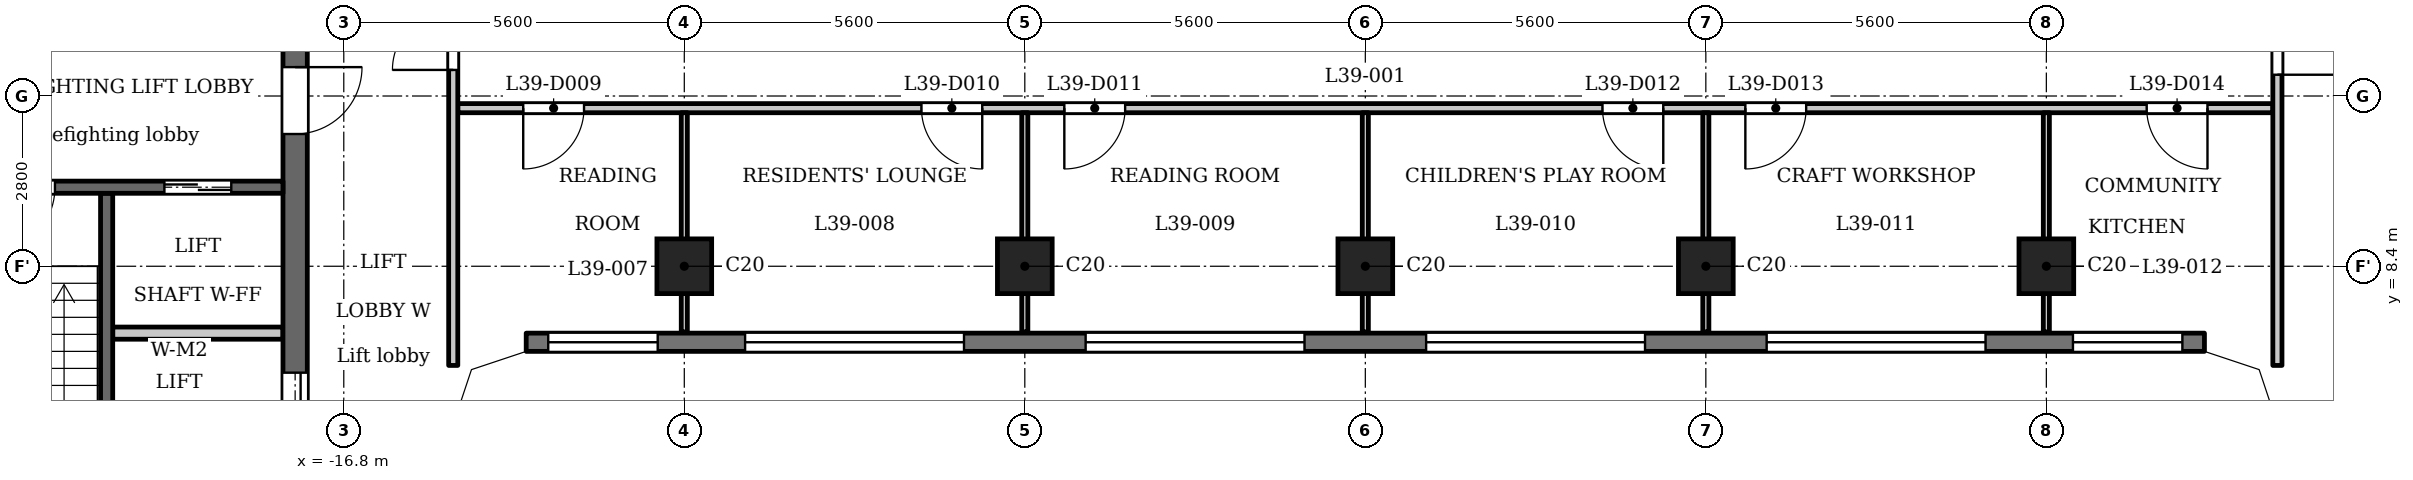
"""IFC4 building model, lengths in metres.
Left out: names, types, materials, properties, quantities, classifications, styles, units other than length and angle.
Written with IfcOpenShell. Run it as: python <this file> out.ifc"""

import sys

from ifc_helpers import new_model, si_unit, direction, frame, frame_2d, origin, origin_2d, place, context, subcontext, project, spatial, polyline, rectangle, outline, extrude, element, fill, save


model = new_model("IFC4")
c1 = context("Model", 3, precision=1e-05, world=origin(), true_north=direction((0.0, 1.0)))
c2 = subcontext(c1, "Body", "Model", "MODEL_VIEW")
j1 = project(units=[si_unit("LENGTHUNIT", "METRE"), si_unit("PLANEANGLEUNIT", "RADIAN")], contexts=[c1])
p1 = place(None, origin())
s1 = spatial("IfcSite", under=j1, at=p1, CompositionType="ELEMENT")
p2 = place(p1, origin())
s2 = spatial("IfcBuilding", under=s1, at=p2, CompositionType="ELEMENT")
p3 = place(p2, frame((0.0, 0.0, 153.6)))
s3 = spatial("IfcBuildingStorey", under=s2, at=p3, CompositionType="ELEMENT", Elevation=153.6)
for number, where, z_axis, x_axis in (
    (1, (-11.2, 8.4, 0.0), (0.0, 0.0, 1.0), (1.0, 0.0, 0.0)),
    (2, (-5.6, 8.4, 0.0), (0.0, 0.0, 1.0), (1.0, 0.0, 0.0)),
    (3, (0.0, 8.4, 0.0), (0.0, 0.0, 1.0), (1.0, 0.0, 0.0)),
    (4, (5.6, 8.4, 0.0), (0.0, 0.0, 1.0), (1.0, 0.0, 0.0)),
    (5, (11.2, 8.4, 0.0), (0.0, 0.0, 1.0), (1.0, 0.0, 0.0)),
):
    element("IfcColumn", number, at=place(p3, frame(where, z_axis=z_axis, x_axis=x_axis)), inside=s3, PredefinedType="COLUMN", context=c2, shape_type="SweptSolid", body=[
        extrude(rectangle(XDim=0.9, YDim=0.9, at=origin_2d()), origin(), (0.0, 0.0, 1.0), 3.5),
    ])
p4 = place(p3, frame((-13.8, 7.15, 0.0), z_axis=(0.0, 0.0, 1.0), x_axis=(1.0, 0.0, 0.0)))
e6 = element("IfcWall", 6, at=p4, inside=s3, PredefinedType="SOLIDWALL", context=c2, shape_type="SweptSolid", body=[
    extrude(rectangle(XDim=27.6, YDim=0.3, at=frame_2d((13.8, 0.0))), origin(), (0.0, 0.0, 1.0), 3.2),
])
p5 = place(p4, frame((0.363, 0.0, 0.9)))
e7 = element("IfcOpeningElement", 7, at=p5, cuts=e6, PredefinedType="OPENING", context=c2, shape_type="SweptSolid", body=[
    extrude(rectangle(XDim=1.8, YDim=1.25, at=frame_2d((0.9, 0.625))), frame((0.0, 0.16, 0.0), z_axis=(0.0, -1.0, 0.0), x_axis=(1.0, 0.0, 0.0)), (0.0, 0.0, 1.0), 0.32),
])
p6 = place(p4, frame((3.6, 0.0, 1.2)))
e8 = element("IfcOpeningElement", 8, at=p6, cuts=e6, PredefinedType="OPENING", context=c2, shape_type="SweptSolid", body=[
    extrude(rectangle(XDim=3.6, YDim=0.95, at=frame_2d((1.8, 0.475))), frame((0.0, 0.16, 0.0), z_axis=(0.0, -1.0, 0.0), x_axis=(1.0, 0.0, 0.0)), (0.0, 0.0, 1.0), 0.32),
])
p7 = place(p4, frame((9.2, 0.0, 1.2)))
e9 = element("IfcOpeningElement", 9, at=p7, cuts=e6, PredefinedType="OPENING", context=c2, shape_type="SweptSolid", body=[
    extrude(rectangle(XDim=3.6, YDim=0.95, at=frame_2d((1.8, 0.475))), frame((0.0, 0.16, 0.0), z_axis=(0.0, -1.0, 0.0), x_axis=(1.0, 0.0, 0.0)), (0.0, 0.0, 1.0), 0.32),
])
p8 = place(p4, frame((14.8, 0.0, 1.2)))
e10 = element("IfcOpeningElement", 10, at=p8, cuts=e6, PredefinedType="OPENING", context=c2, shape_type="SweptSolid", body=[
    extrude(rectangle(XDim=3.6, YDim=0.95, at=frame_2d((1.8, 0.475))), frame((0.0, 0.16, 0.0), z_axis=(0.0, -1.0, 0.0), x_axis=(1.0, 0.0, 0.0)), (0.0, 0.0, 1.0), 0.32),
])
p9 = place(p4, frame((20.4, 0.0, 1.2)))
e11 = element("IfcOpeningElement", 11, at=p9, cuts=e6, PredefinedType="OPENING", context=c2, shape_type="SweptSolid", body=[
    extrude(rectangle(XDim=3.6, YDim=0.95, at=frame_2d((1.8, 0.475))), frame((0.0, 0.16, 0.0), z_axis=(0.0, -1.0, 0.0), x_axis=(1.0, 0.0, 0.0)), (0.0, 0.0, 1.0), 0.32),
])
p10 = place(p4, frame((25.438, 0.0, 0.9)))
e12 = element("IfcOpeningElement", 12, at=p10, cuts=e6, PredefinedType="OPENING", context=c2, shape_type="SweptSolid", body=[
    extrude(rectangle(XDim=1.8, YDim=1.25, at=frame_2d((0.9, 0.625))), frame((0.0, 0.16, 0.0), z_axis=(0.0, -1.0, 0.0), x_axis=(1.0, 0.0, 0.0)), (0.0, 0.0, 1.0), 0.32),
])
p11 = place(p3, frame((-20.7, 2.6, 0.0), z_axis=(0.0, 0.0, 1.0), x_axis=(0.0, 1.0, 0.0)))
e13 = element("IfcWall", 13, at=p11, inside=s3, PredefinedType="SHEAR", context=c2, shape_type="SweptSolid", body=[
    extrude(rectangle(XDim=7.0, YDim=0.2, at=frame_2d((3.5, 0.0))), origin(), (0.0, 0.0, 1.0), 3.2),
])
p12 = place(p3, frame((-17.6, -12.45, 0.0), z_axis=(0.0, 0.0, 1.0), x_axis=(0.0, 1.0, 0.0)))
e14 = element("IfcWall", 14, at=p12, inside=s3, PredefinedType="SHEAR", context=c2, shape_type="SweptSolid", body=[
    extrude(rectangle(XDim=24.9, YDim=0.4, at=frame_2d((12.45, 0.0))), origin(), (0.0, 0.0, 1.0), 3.2),
])
p13 = place(p12, frame((6.325, 0.0, 0.0)))
e15 = element("IfcOpeningElement", 15, at=p13, cuts=e14, PredefinedType="OPENING", context=c2, shape_type="SweptSolid", body=[
    extrude(rectangle(XDim=0.9, YDim=2.1, at=frame_2d((0.45, 1.05))), frame((0.0, 0.21, 0.0), z_axis=(0.0, -1.0, 0.0), x_axis=(1.0, 0.0, 0.0)), (0.0, 0.0, 1.0), 0.42),
])
p14 = place(p12, frame((9.925, 0.0, 0.0)))
e16 = element("IfcOpeningElement", 16, at=p14, cuts=e14, PredefinedType="OPENING", context=c2, shape_type="SweptSolid", body=[
    extrude(rectangle(XDim=0.9, YDim=2.1, at=frame_2d((0.45, 1.05))), frame((0.0, 0.21, 0.0), z_axis=(0.0, -1.0, 0.0), x_axis=(1.0, 0.0, 0.0)), (0.0, 0.0, 1.0), 0.42),
])
p15 = place(p12, frame((15.6, 0.0, 0.0)))
e17 = element("IfcOpeningElement", 17, at=p15, cuts=e14, PredefinedType="OPENING", context=c2, shape_type="SweptSolid", body=[
    extrude(rectangle(XDim=1.1, YDim=2.1, at=frame_2d((0.55, 1.05))), frame((0.0, 0.21, 0.0), z_axis=(0.0, -1.0, 0.0), x_axis=(1.0, 0.0, 0.0)), (0.0, 0.0, 1.0), 0.42),
])
p16 = place(p12, frame((18.0, 0.0, 0.0)))
e18 = element("IfcOpeningElement", 18, at=p16, cuts=e14, PredefinedType="OPENING", context=c2, shape_type="SweptSolid", body=[
    extrude(rectangle(XDim=1.1, YDim=2.1, at=frame_2d((0.55, 1.05))), frame((0.0, 0.21, 0.0), z_axis=(0.0, -1.0, 0.0), x_axis=(1.0, 0.0, 0.0)), (0.0, 0.0, 1.0), 0.42),
])
p17 = place(p12, frame((23.025, 0.0, 0.0)))
e19 = element("IfcOpeningElement", 19, at=p17, cuts=e14, PredefinedType="OPENING", context=c2, shape_type="SweptSolid", body=[
    extrude(rectangle(XDim=1.1, YDim=2.1, at=frame_2d((0.55, 1.05))), frame((0.0, 0.21, 0.0), z_axis=(0.0, -1.0, 0.0), x_axis=(1.0, 0.0, 0.0)), (0.0, 0.0, 1.0), 0.42),
])
p18 = place(p12, frame((0.775, 0.0, 0.0)))
e20 = element("IfcOpeningElement", 20, at=p18, cuts=e14, PredefinedType="OPENING", context=c2, shape_type="SweptSolid", body=[
    extrude(rectangle(XDim=1.1, YDim=2.1, at=frame_2d((0.55, 1.05))), frame((0.0, 0.21, 0.0), z_axis=(0.0, -1.0, 0.0), x_axis=(1.0, 0.0, 0.0)), (0.0, 0.0, 1.0), 0.42),
])
p19 = place(p12, frame((12.925, 0.0, 0.0)))
e21 = element("IfcOpeningElement", 21, at=p19, cuts=e14, PredefinedType="OPENING", context=c2, shape_type="SweptSolid", body=[
    extrude(rectangle(XDim=1.8, YDim=2.1, at=frame_2d((0.9, 1.05))), frame((0.0, 0.21, 0.0), z_axis=(0.0, -1.0, 0.0), x_axis=(1.0, 0.0, 0.0)), (0.0, 0.0, 1.0), 0.42),
])
p20 = place(p3, frame((-17.8, 7.3, 0.0), z_axis=(0.0, 0.0, 1.0), x_axis=(-1.0, 0.0, 0.0)))
e22 = element("IfcWall", 22, at=p20, inside=s3, PredefinedType="PARTITIONING", context=c2, shape_type="SweptSolid", body=[
    extrude(rectangle(XDim=2.8, YDim=0.2, at=frame_2d((1.4, 0.0))), origin(), (0.0, 0.0, 1.0), 3.2),
])
p21 = place(p3, frame((-17.8, 9.7, 0.0), z_axis=(0.0, 0.0, 1.0), x_axis=(-1.0, 0.0, 0.0)))
e23 = element("IfcWall", 23, at=p21, inside=s3, PredefinedType="SHEAR", context=c2, shape_type="SweptSolid", body=[
    extrude(rectangle(XDim=8.45, YDim=0.2, at=frame_2d((4.225, 0.0))), origin(), (0.0, 0.0, 1.0), 3.2),
])
p22 = place(p21, frame((0.85, 0.0, 0.0)))
e24 = element("IfcOpeningElement", 24, at=p22, cuts=e23, PredefinedType="OPENING", context=c2, shape_type="SweptSolid", body=[
    extrude(rectangle(XDim=1.1, YDim=2.1, at=frame_2d((0.55, 1.05))), frame((0.0, 0.11, 0.0), z_axis=(0.0, -1.0, 0.0), x_axis=(1.0, 0.0, 0.0)), (0.0, 0.0, 1.0), 0.22),
])
p23 = place(p21, frame((3.75, 0.0, 0.0)))
e25 = element("IfcOpeningElement", 25, at=p23, cuts=e23, PredefinedType="OPENING", context=c2, shape_type="SweptSolid", body=[
    extrude(rectangle(XDim=1.1, YDim=2.1, at=frame_2d((0.55, 1.05))), frame((0.0, 0.11, 0.0), z_axis=(0.0, -1.0, 0.0), x_axis=(1.0, 0.0, 0.0)), (0.0, 0.0, 1.0), 0.22),
])
p24 = place(p3, frame((-14.925, 11.0, 0.0), z_axis=(0.0, 0.0, 1.0), x_axis=(1.0, 0.0, 0.0)))
e26 = element("IfcWall", 26, at=p24, inside=s3, PredefinedType="PARTITIONING", context=c2, shape_type="SweptSolid", body=[
    extrude(rectangle(XDim=29.85, YDim=0.15, at=frame_2d((14.925, 0.0))), origin(), (0.0, 0.0, 1.0), 3.2),
])
p25 = place(p24, frame((1.076, 0.0, 0.0)))
e27 = element("IfcOpeningElement", 27, at=p25, cuts=e26, PredefinedType="OPENING", context=c2, shape_type="SweptSolid", body=[
    extrude(rectangle(XDim=1.0, YDim=2.1, at=frame_2d((0.5, 1.05))), frame((0.0, 0.085, 0.0), z_axis=(0.0, -1.0, 0.0), x_axis=(1.0, 0.0, 0.0)), (0.0, 0.0, 1.0), 0.17),
])
p26 = place(p24, frame((7.625, 0.0, 0.0)))
e28 = element("IfcOpeningElement", 28, at=p26, cuts=e26, PredefinedType="OPENING", context=c2, shape_type="SweptSolid", body=[
    extrude(rectangle(XDim=1.0, YDim=2.1, at=frame_2d((0.5, 1.05))), frame((0.0, 0.085, 0.0), z_axis=(0.0, -1.0, 0.0), x_axis=(1.0, 0.0, 0.0)), (0.0, 0.0, 1.0), 0.17),
])
p27 = place(p24, frame((9.975, 0.0, 0.0)))
e29 = element("IfcOpeningElement", 29, at=p27, cuts=e26, PredefinedType="OPENING", context=c2, shape_type="SweptSolid", body=[
    extrude(rectangle(XDim=1.0, YDim=2.1, at=frame_2d((0.5, 1.05))), frame((0.0, 0.085, 0.0), z_axis=(0.0, -1.0, 0.0), x_axis=(1.0, 0.0, 0.0)), (0.0, 0.0, 1.0), 0.17),
])
p28 = place(p24, frame((18.825, 0.0, 0.0)))
e30 = element("IfcOpeningElement", 30, at=p28, cuts=e26, PredefinedType="OPENING", context=c2, shape_type="SweptSolid", body=[
    extrude(rectangle(XDim=1.0, YDim=2.1, at=frame_2d((0.5, 1.05))), frame((0.0, 0.085, 0.0), z_axis=(0.0, -1.0, 0.0), x_axis=(1.0, 0.0, 0.0)), (0.0, 0.0, 1.0), 0.17),
])
p29 = place(p24, frame((21.175, 0.0, 0.0)))
e31 = element("IfcOpeningElement", 31, at=p29, cuts=e26, PredefinedType="OPENING", context=c2, shape_type="SweptSolid", body=[
    extrude(rectangle(XDim=1.0, YDim=2.1, at=frame_2d((0.5, 1.05))), frame((0.0, 0.085, 0.0), z_axis=(0.0, -1.0, 0.0), x_axis=(1.0, 0.0, 0.0)), (0.0, 0.0, 1.0), 0.17),
])
p30 = place(p24, frame((27.775, 0.0, 0.0)))
e32 = element("IfcOpeningElement", 32, at=p30, cuts=e26, PredefinedType="OPENING", context=c2, shape_type="SweptSolid", body=[
    extrude(rectangle(XDim=1.0, YDim=2.1, at=frame_2d((0.5, 1.05))), frame((0.0, 0.085, 0.0), z_axis=(0.0, -1.0, 0.0), x_axis=(1.0, 0.0, 0.0)), (0.0, 0.0, 1.0), 0.17),
])
p31 = place(p3, frame((-15.0, 6.769, 0.0), z_axis=(0.0, 0.0, 1.0), x_axis=(0.0, 1.0, 0.0)))
e33 = element("IfcWall", 33, at=p31, inside=s3, PredefinedType="PARTITIONING", context=c2, shape_type="SweptSolid", body=[
    extrude(rectangle(XDim=6.356, YDim=0.15, at=frame_2d((3.178, 0.0))), origin(), (0.0, 0.0, 1.0), 3.2),
])
p32 = place(p31, frame((4.86, 0.0, 0.0)))
e34 = element("IfcOpeningElement", 34, at=p32, cuts=e33, PredefinedType="OPENING", context=c2, shape_type="SweptSolid", body=[
    extrude(rectangle(XDim=1.0, YDim=2.1, at=frame_2d((0.5, 1.05))), frame((0.0, 0.085, 0.0), z_axis=(0.0, -1.0, 0.0), x_axis=(1.0, 0.0, 0.0)), (0.0, 0.0, 1.0), 0.17),
])
for number, where, z_axis, x_axis in (
    (35, (-11.2, 7.32, 0.0), (0.0, 0.0, 1.0), (0.0, 1.0, 0.0)),
    (36, (-5.6, 7.32, 0.0), (0.0, 0.0, 1.0), (0.0, 1.0, 0.0)),
    (37, (0.0, 7.32, 0.0), (0.0, 0.0, 1.0), (0.0, 1.0, 0.0)),
    (38, (5.6, 7.32, 0.0), (0.0, 0.0, 1.0), (0.0, 1.0, 0.0)),
    (39, (11.2, 7.32, 0.0), (0.0, 0.0, 1.0), (0.0, 1.0, 0.0)),
):
    element("IfcWall", number, at=place(p3, frame(where, z_axis=z_axis, x_axis=x_axis)), inside=s3, PredefinedType="PARTITIONING", context=c2, shape_type="SweptSolid", body=[
        extrude(rectangle(XDim=3.605, YDim=0.1, at=frame_2d((1.802, 0.0))), origin(), (0.0, 0.0, 1.0), 3.2),
    ])
p33 = place(p3, frame((15.0, 6.769, 0.0), z_axis=(0.0, 0.0, 1.0), x_axis=(0.0, 1.0, 0.0)))
e40 = element("IfcWall", 40, at=p33, inside=s3, PredefinedType="PARTITIONING", context=c2, shape_type="SweptSolid", body=[
    extrude(rectangle(XDim=6.356, YDim=0.15, at=frame_2d((3.178, 0.0))), origin(), (0.0, 0.0, 1.0), 3.2),
])
p34 = place(p33, frame((4.781, 0.0, 0.0)))
e41 = element("IfcOpeningElement", 41, at=p34, cuts=e40, PredefinedType="OPENING", context=c2, shape_type="SweptSolid", body=[
    extrude(rectangle(XDim=1.0, YDim=2.1, at=frame_2d((0.5, 1.05))), frame((0.0, 0.085, 0.0), z_axis=(0.0, -1.0, 0.0), x_axis=(1.0, 0.0, 0.0)), (0.0, 0.0, 1.0), 0.17),
])
p35 = place(p3, origin())
e42 = element("IfcWall", 42, at=p35, inside=s3, PredefinedType="SOLIDWALL", context=c2, shape_type="SweptSolid", body=[
    extrude(outline(polyline([(-13.849, 7.3), (-14.937, 6.937), (-15.3, 5.849), (-15.3, 5.8), (-15.0, 5.8), (-14.7, 6.7), (-13.8, 7.0), (-13.8, 7.3), (-13.849, 7.3)])), origin(), (0.0, 0.0, 1.0), 3.2),
])
e43 = element("IfcWall", 43, at=p35, inside=s3, PredefinedType="SOLIDWALL", context=c2, shape_type="SweptSolid", body=[
    extrude(outline(polyline([(14.937, 6.937), (13.849, 7.3), (13.8, 7.3), (13.8, 7.0), (14.7, 6.7), (15.0, 5.8), (15.3, 5.8), (15.3, 5.849), (14.937, 6.937)])), origin(), (0.0, 0.0, 1.0), 3.2),
])
p36 = place(p16, origin())
e44 = element("IfcDoor", 44, at=p36, inside=s3, OperationType="DOUBLE_DOOR_SLIDING", PredefinedType="DOOR", context=c2, shape_type="SweptSolid", body=[
    extrude(rectangle(XDim=1.1, YDim=2.1, at=frame_2d((0.55, 1.05))), frame((0.0, 0.025, 0.0), z_axis=(0.0, -1.0, 0.0), x_axis=(1.0, 0.0, 0.0)), (0.0, 0.0, 1.0), 0.05),
])
fill(e18, e44)
p37 = place(p22, origin())
e45 = element("IfcDoor", 45, at=p37, inside=s3, OperationType="DOUBLE_DOOR_SLIDING", PredefinedType="DOOR", context=c2, shape_type="SweptSolid", body=[
    extrude(rectangle(XDim=1.1, YDim=2.1, at=frame_2d((0.55, 1.05))), frame((0.0, 0.025, 0.0), z_axis=(0.0, -1.0, 0.0), x_axis=(1.0, 0.0, 0.0)), (0.0, 0.0, 1.0), 0.05),
])
fill(e24, e45)
p38 = place(p17, origin())
e46 = element("IfcDoor", 46, at=p38, inside=s3, OperationType="SINGLE_SWING_RIGHT", PredefinedType="DOOR", context=c2, shape_type="SweptSolid", body=[
    extrude(rectangle(XDim=1.1, YDim=2.1, at=frame_2d((0.55, 1.05))), frame((0.0, 0.025, 0.0), z_axis=(0.0, -1.0, 0.0), x_axis=(1.0, 0.0, 0.0)), (0.0, 0.0, 1.0), 0.05),
])
fill(e19, e46)
p39 = place(p23, origin())
e47 = element("IfcDoor", 47, at=p39, inside=s3, OperationType="SINGLE_SWING_LEFT", PredefinedType="DOOR", context=c2, shape_type="SweptSolid", body=[
    extrude(rectangle(XDim=1.1, YDim=2.1, at=frame_2d((0.55, 1.05))), frame((0.0, 0.025, 0.0), z_axis=(0.0, -1.0, 0.0), x_axis=(1.0, 0.0, 0.0)), (0.0, 0.0, 1.0), 0.05),
])
fill(e25, e47)
p40 = place(p32, origin())
e48 = element("IfcDoor", 48, at=p40, inside=s3, OperationType="SINGLE_SWING_RIGHT", PredefinedType="DOOR", context=c2, shape_type="SweptSolid", body=[
    extrude(rectangle(XDim=1.0, YDim=2.1, at=frame_2d((0.5, 1.05))), frame((0.0, 0.025, 0.0), z_axis=(0.0, -1.0, 0.0), x_axis=(1.0, 0.0, 0.0)), (0.0, 0.0, 1.0), 0.05),
])
fill(e34, e48)
p41 = place(p34, origin())
e49 = element("IfcDoor", 49, at=p41, inside=s3, OperationType="SINGLE_SWING_LEFT", PredefinedType="DOOR", context=c2, shape_type="SweptSolid", body=[
    extrude(rectangle(XDim=1.0, YDim=2.1, at=frame_2d((0.5, 1.05))), frame((0.0, 0.025, 0.0), z_axis=(0.0, -1.0, 0.0), x_axis=(1.0, 0.0, 0.0)), (0.0, 0.0, 1.0), 0.05),
])
fill(e41, e49)
p42 = place(p25, origin())
e50 = element("IfcDoor", 50, at=p42, inside=s3, OperationType="SINGLE_SWING_LEFT", PredefinedType="DOOR", context=c2, shape_type="SweptSolid", body=[
    extrude(rectangle(XDim=1.0, YDim=2.1, at=frame_2d((0.5, 1.05))), frame((0.0, 0.025, 0.0), z_axis=(0.0, -1.0, 0.0), x_axis=(1.0, 0.0, 0.0)), (0.0, 0.0, 1.0), 0.05),
])
fill(e27, e50)
p43 = place(p26, origin())
e51 = element("IfcDoor", 51, at=p43, inside=s3, OperationType="SINGLE_SWING_RIGHT", PredefinedType="DOOR", context=c2, shape_type="SweptSolid", body=[
    extrude(rectangle(XDim=1.0, YDim=2.1, at=frame_2d((0.5, 1.05))), frame((0.0, 0.025, 0.0), z_axis=(0.0, -1.0, 0.0), x_axis=(1.0, 0.0, 0.0)), (0.0, 0.0, 1.0), 0.05),
])
fill(e28, e51)
p44 = place(p27, origin())
e52 = element("IfcDoor", 52, at=p44, inside=s3, OperationType="SINGLE_SWING_LEFT", PredefinedType="DOOR", context=c2, shape_type="SweptSolid", body=[
    extrude(rectangle(XDim=1.0, YDim=2.1, at=frame_2d((0.5, 1.05))), frame((0.0, 0.025, 0.0), z_axis=(0.0, -1.0, 0.0), x_axis=(1.0, 0.0, 0.0)), (0.0, 0.0, 1.0), 0.05),
])
fill(e29, e52)
p45 = place(p28, origin())
e53 = element("IfcDoor", 53, at=p45, inside=s3, OperationType="SINGLE_SWING_RIGHT", PredefinedType="DOOR", context=c2, shape_type="SweptSolid", body=[
    extrude(rectangle(XDim=1.0, YDim=2.1, at=frame_2d((0.5, 1.05))), frame((0.0, 0.025, 0.0), z_axis=(0.0, -1.0, 0.0), x_axis=(1.0, 0.0, 0.0)), (0.0, 0.0, 1.0), 0.05),
])
fill(e30, e53)
p46 = place(p29, origin())
e54 = element("IfcDoor", 54, at=p46, inside=s3, OperationType="SINGLE_SWING_LEFT", PredefinedType="DOOR", context=c2, shape_type="SweptSolid", body=[
    extrude(rectangle(XDim=1.0, YDim=2.1, at=frame_2d((0.5, 1.05))), frame((0.0, 0.025, 0.0), z_axis=(0.0, -1.0, 0.0), x_axis=(1.0, 0.0, 0.0)), (0.0, 0.0, 1.0), 0.05),
])
fill(e31, e54)
p47 = place(p30, origin())
e55 = element("IfcDoor", 55, at=p47, inside=s3, OperationType="SINGLE_SWING_RIGHT", PredefinedType="DOOR", context=c2, shape_type="SweptSolid", body=[
    extrude(rectangle(XDim=1.0, YDim=2.1, at=frame_2d((0.5, 1.05))), frame((0.0, 0.025, 0.0), z_axis=(0.0, -1.0, 0.0), x_axis=(1.0, 0.0, 0.0)), (0.0, 0.0, 1.0), 0.05),
])
fill(e32, e55)
p48 = place(p5, origin())
e56 = element("IfcWindow", 56, at=p48, inside=s3, PartitioningType="SINGLE_PANEL", PredefinedType="WINDOW", context=c2, shape_type="SweptSolid", body=[
    extrude(rectangle(XDim=1.8, YDim=1.25, at=frame_2d((0.9, 0.625))), frame((0.0, 0.03, 0.0), z_axis=(0.0, -1.0, 0.0), x_axis=(1.0, 0.0, 0.0)), (0.0, 0.0, 1.0), 0.06),
])
fill(e7, e56)
p49 = place(p6, origin())
e57 = element("IfcWindow", 57, at=p49, inside=s3, PartitioningType="SINGLE_PANEL", PredefinedType="WINDOW", context=c2, shape_type="SweptSolid", body=[
    extrude(rectangle(XDim=3.6, YDim=0.95, at=frame_2d((1.8, 0.475))), frame((0.0, 0.03, 0.0), z_axis=(0.0, -1.0, 0.0), x_axis=(1.0, 0.0, 0.0)), (0.0, 0.0, 1.0), 0.06),
])
fill(e8, e57)
p50 = place(p7, origin())
e58 = element("IfcWindow", 58, at=p50, inside=s3, PartitioningType="SINGLE_PANEL", PredefinedType="WINDOW", context=c2, shape_type="SweptSolid", body=[
    extrude(rectangle(XDim=3.6, YDim=0.95, at=frame_2d((1.8, 0.475))), frame((0.0, 0.03, 0.0), z_axis=(0.0, -1.0, 0.0), x_axis=(1.0, 0.0, 0.0)), (0.0, 0.0, 1.0), 0.06),
])
fill(e9, e58)
p51 = place(p8, origin())
e59 = element("IfcWindow", 59, at=p51, inside=s3, PartitioningType="SINGLE_PANEL", PredefinedType="WINDOW", context=c2, shape_type="SweptSolid", body=[
    extrude(rectangle(XDim=3.6, YDim=0.95, at=frame_2d((1.8, 0.475))), frame((0.0, 0.03, 0.0), z_axis=(0.0, -1.0, 0.0), x_axis=(1.0, 0.0, 0.0)), (0.0, 0.0, 1.0), 0.06),
])
fill(e10, e59)
p52 = place(p9, origin())
e60 = element("IfcWindow", 60, at=p52, inside=s3, PartitioningType="SINGLE_PANEL", PredefinedType="WINDOW", context=c2, shape_type="SweptSolid", body=[
    extrude(rectangle(XDim=3.6, YDim=0.95, at=frame_2d((1.8, 0.475))), frame((0.0, 0.03, 0.0), z_axis=(0.0, -1.0, 0.0), x_axis=(1.0, 0.0, 0.0)), (0.0, 0.0, 1.0), 0.06),
])
fill(e11, e60)
p53 = place(p10, origin())
e61 = element("IfcWindow", 61, at=p53, inside=s3, PartitioningType="SINGLE_PANEL", PredefinedType="WINDOW", context=c2, shape_type="SweptSolid", body=[
    extrude(rectangle(XDim=1.8, YDim=1.25, at=frame_2d((0.9, 0.625))), frame((0.0, 0.03, 0.0), z_axis=(0.0, -1.0, 0.0), x_axis=(1.0, 0.0, 0.0)), (0.0, 0.0, 1.0), 0.06),
])
fill(e12, e61)
save(model, sys.argv[1])
